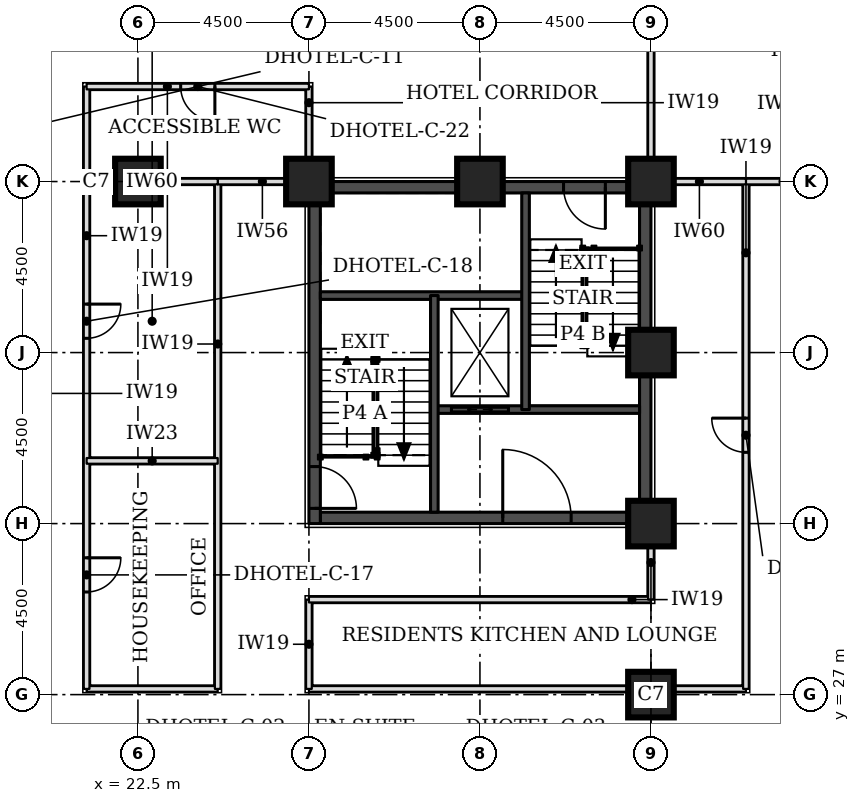
"""IFC4 building model, lengths in metres.
Left out: names, types, materials, properties, quantities, classifications, styles, units other than length and angle.
Written with IfcOpenShell. Run it as: python <this file> out.ifc"""

import sys

from ifc_helpers import new_model, si_unit, direction, frame, frame_2d, origin, origin_2d, place, context, subcontext, project, spatial, rectangle, extrude, element, fill, save


model = new_model("IFC4")
c1 = context("Model", 3, precision=1e-05, world=origin(), true_north=direction((0.0, 1.0)))
c2 = subcontext(c1, "Body", "Model", "MODEL_VIEW")
j1 = project(units=[si_unit("LENGTHUNIT", "METRE"), si_unit("PLANEANGLEUNIT", "RADIAN")], contexts=[c1])
p1 = place(None, origin())
s1 = spatial("IfcSite", under=j1, at=p1, CompositionType="ELEMENT")
p2 = place(p1, origin())
s2 = spatial("IfcBuilding", under=s1, at=p2, CompositionType="ELEMENT")
p3 = place(p2, frame((0.0, 0.0, 56.1)))
s3 = spatial("IfcBuildingStorey", under=s2, at=p3, CompositionType="ELEMENT", Elevation=56.1)
for number, where, z_axis, x_axis in (
    (1, (36.0, 27.0, 0.0), (0.0, 0.0, 1.0), (1.0, 0.0, 0.0)),
    (2, (36.0, 31.5, 0.0), (0.0, 0.0, 1.0), (1.0, 0.0, 0.0)),
    (3, (36.0, 36.0, 0.0), (0.0, 0.0, 1.0), (1.0, 0.0, 0.0)),
    (4, (22.5, 40.5, 0.0), (0.0, 0.0, 1.0), (1.0, 0.0, 0.0)),
    (5, (27.0, 40.5, 0.0), (0.0, 0.0, 1.0), (1.0, 0.0, 0.0)),
    (6, (31.5, 40.5, 0.0), (0.0, 0.0, 1.0), (1.0, 0.0, 0.0)),
    (7, (36.0, 40.5, 0.0), (0.0, 0.0, 1.0), (1.0, 0.0, 0.0)),
):
    element("IfcColumn", number, at=place(p3, frame(where, z_axis=z_axis, x_axis=x_axis)), inside=s3, PredefinedType="COLUMN", context=c2, shape_type="SweptSolid", body=[
        extrude(rectangle(XDim=1.2, YDim=1.2, at=origin_2d()), origin(), (0.0, 0.0, 1.0), 3.3),
    ])
p4 = place(p3, frame((27.3, 31.65, 0.0), z_axis=(0.0, 0.0, 1.0), x_axis=(1.0, 0.0, 0.0)))
e8 = element("IfcWall", 8, at=p4, inside=s3, PredefinedType="SHEAR", context=c2, shape_type="SweptSolid", body=[
    extrude(rectangle(XDim=8.4, YDim=0.3, at=frame_2d((4.2, 0.0))), origin(), (0.0, 0.0, 1.0), 3.3),
])
p5 = place(p4, frame((4.8, 0.0, 0.0)))
e9 = element("IfcOpeningElement", 9, at=p5, cuts=e8, PredefinedType="OPENING", context=c2, shape_type="SweptSolid", body=[
    extrude(rectangle(XDim=1.8, YDim=2.1, at=frame_2d((0.9, 1.05))), frame((0.0, 0.16, 0.0), z_axis=(0.0, -1.0, 0.0), x_axis=(1.0, 0.0, 0.0)), (0.0, 0.0, 1.0), 0.32),
])
p6 = place(p3, frame((27.3, 40.35, 0.0), z_axis=(0.0, 0.0, 1.0), x_axis=(1.0, 0.0, 0.0)))
e10 = element("IfcWall", 10, at=p6, inside=s3, PredefinedType="SHEAR", context=c2, shape_type="SweptSolid", body=[
    extrude(rectangle(XDim=8.4, YDim=0.3, at=frame_2d((4.2, 0.0))), origin(), (0.0, 0.0, 1.0), 3.3),
])
p7 = place(p6, frame((6.4, 0.0, 0.0)))
e11 = element("IfcOpeningElement", 11, at=p7, cuts=e10, PredefinedType="OPENING", context=c2, shape_type="SweptSolid", body=[
    extrude(rectangle(XDim=1.1, YDim=2.1, at=frame_2d((0.55, 1.05))), frame((0.0, 0.16, 0.0), z_axis=(0.0, -1.0, 0.0), x_axis=(1.0, 0.0, 0.0)), (0.0, 0.0, 1.0), 0.32),
])
p8 = place(p3, frame((27.15, 31.5, 0.0), z_axis=(0.0, 0.0, 1.0), x_axis=(0.0, 1.0, 0.0)))
e12 = element("IfcWall", 12, at=p8, inside=s3, PredefinedType="SHEAR", context=c2, shape_type="SweptSolid", body=[
    extrude(rectangle(XDim=9.0, YDim=0.3, at=frame_2d((4.5, 0.0))), origin(), (0.0, 0.0, 1.0), 3.3),
])
p9 = place(p8, frame((0.4, 0.0, 0.0)))
e13 = element("IfcOpeningElement", 13, at=p9, cuts=e12, PredefinedType="OPENING", context=c2, shape_type="SweptSolid", body=[
    extrude(rectangle(XDim=1.1, YDim=2.1, at=frame_2d((0.55, 1.05))), frame((0.0, 0.16, 0.0), z_axis=(0.0, -1.0, 0.0), x_axis=(1.0, 0.0, 0.0)), (0.0, 0.0, 1.0), 0.32),
])
p10 = place(p3, frame((35.85, 31.5, 0.0), z_axis=(0.0, 0.0, 1.0), x_axis=(0.0, 1.0, 0.0)))
e14 = element("IfcWall", 14, at=p10, inside=s3, PredefinedType="SHEAR", context=c2, shape_type="SweptSolid", body=[
    extrude(rectangle(XDim=9.0, YDim=0.3, at=frame_2d((4.5, 0.0))), origin(), (0.0, 0.0, 1.0), 3.3),
])
p11 = place(p3, frame((21.15, 27.15, 0.0), z_axis=(0.0, 0.0, 1.0), x_axis=(1.0, 0.0, 0.0)))
e15 = element("IfcWall", 15, at=p11, inside=s3, PredefinedType="PARTITIONING", context=c2, shape_type="SweptSolid", body=[
    extrude(rectangle(XDim=3.45, YDim=0.15, at=frame_2d((1.725, 0.0))), origin(), (0.0, 0.0, 1.0), 3.08),
])
p12 = place(p3, frame((21.15, 27.15, 0.0), z_axis=(0.0, 0.0, 1.0), x_axis=(0.0, 1.0, 0.0)))
e16 = element("IfcWall", 16, at=p12, inside=s3, PredefinedType="PARTITIONING", context=c2, shape_type="SweptSolid", body=[
    extrude(rectangle(XDim=15.85, YDim=0.15, at=frame_2d((7.925, 0.0))), origin(), (0.0, 0.0, 1.0), 3.08),
])
p13 = place(p12, frame((2.55, 0.0, 0.0)))
e17 = element("IfcOpeningElement", 17, at=p13, cuts=e16, PredefinedType="OPENING", context=c2, shape_type="SweptSolid", body=[
    extrude(rectangle(XDim=0.9, YDim=2.1, at=frame_2d((0.45, 1.05))), frame((0.0, 0.085, 0.0), z_axis=(0.0, -1.0, 0.0), x_axis=(1.0, 0.0, 0.0)), (0.0, 0.0, 1.0), 0.17),
])
p14 = place(p12, frame((9.225, 0.0, 0.0)))
e18 = element("IfcOpeningElement", 18, at=p14, cuts=e16, PredefinedType="OPENING", context=c2, shape_type="SweptSolid", body=[
    extrude(rectangle(XDim=0.9, YDim=2.1, at=frame_2d((0.45, 1.05))), frame((0.0, 0.085, 0.0), z_axis=(0.0, -1.0, 0.0), x_axis=(1.0, 0.0, 0.0)), (0.0, 0.0, 1.0), 0.17),
])
p15 = place(p3, frame((24.6, 27.15, 0.0), z_axis=(0.0, 0.0, 1.0), x_axis=(0.0, 1.0, 0.0)))
e19 = element("IfcWall", 19, at=p15, inside=s3, PredefinedType="PARTITIONING", context=c2, shape_type="SweptSolid", body=[
    extrude(rectangle(XDim=13.35, YDim=0.15, at=frame_2d((6.675, 0.0))), origin(), (0.0, 0.0, 1.0), 3.08),
])
p16 = place(p3, frame((27.0, 27.15, 0.0), z_axis=(0.0, 0.0, 1.0), x_axis=(1.0, 0.0, 0.0)))
e20 = element("IfcWall", 20, at=p16, inside=s3, PredefinedType="PARTITIONING", context=c2, shape_type="SweptSolid", body=[
    extrude(rectangle(XDim=11.5, YDim=0.15, at=frame_2d((5.75, 0.0))), origin(), (0.0, 0.0, 1.0), 3.08),
])
p17 = place(p3, frame((27.0, 27.15, 0.0), z_axis=(0.0, 0.0, 1.0), x_axis=(0.0, 1.0, 0.0)))
e21 = element("IfcWall", 21, at=p17, inside=s3, PredefinedType="PARTITIONING", context=c2, shape_type="SweptSolid", body=[
    extrude(rectangle(XDim=2.35, YDim=0.15, at=frame_2d((1.175, 0.0))), origin(), (0.0, 0.0, 1.0), 3.08),
])
p18 = place(p3, frame((38.5, 27.15, 0.0), z_axis=(0.0, 0.0, 1.0), x_axis=(0.0, 1.0, 0.0)))
e22 = element("IfcWall", 22, at=p18, inside=s3, PredefinedType="PARTITIONING", context=c2, shape_type="SweptSolid", body=[
    extrude(rectangle(XDim=13.35, YDim=0.15, at=frame_2d((6.675, 0.0))), origin(), (0.0, 0.0, 1.0), 3.08),
])
p19 = place(p18, frame((6.225, 0.0, 0.0)))
e23 = element("IfcOpeningElement", 23, at=p19, cuts=e22, PredefinedType="OPENING", context=c2, shape_type="SweptSolid", body=[
    extrude(rectangle(XDim=0.9, YDim=2.1, at=frame_2d((0.45, 1.05))), frame((0.0, 0.085, 0.0), z_axis=(0.0, -1.0, 0.0), x_axis=(1.0, 0.0, 0.0)), (0.0, 0.0, 1.0), 0.17),
])
p20 = place(p3, frame((27.0, 29.5, 0.0), z_axis=(0.0, 0.0, 1.0), x_axis=(1.0, 0.0, 0.0)))
e24 = element("IfcWall", 24, at=p20, inside=s3, PredefinedType="PARTITIONING", context=c2, shape_type="SweptSolid", body=[
    extrude(rectangle(XDim=9.0, YDim=0.15, at=frame_2d((4.5, 0.0))), origin(), (0.0, 0.0, 1.0), 3.08),
])
p21 = place(p3, frame((36.0, 29.5, 0.0), z_axis=(0.0, 0.0, 1.0), x_axis=(0.0, 1.0, 0.0)))
e25 = element("IfcWall", 25, at=p21, inside=s3, PredefinedType="PARTITIONING", context=c2, shape_type="SweptSolid", body=[
    extrude(rectangle(XDim=1.95, YDim=0.15, at=frame_2d((0.975, 0.0))), origin(), (0.0, 0.0, 1.0), 2.33),
])
p22 = place(p3, frame((24.6, 40.5, 0.0), z_axis=(0.0, 0.0, 1.0), x_axis=(1.0, 0.0, 0.0)))
e26 = element("IfcWall", 26, at=p22, inside=s3, PredefinedType="PARTITIONING", context=c2, shape_type="SweptSolid", body=[
    extrude(rectangle(XDim=2.35, YDim=0.15, at=frame_2d((1.175, 0.0))), origin(), (0.0, 0.0, 1.0), 2.33),
])
p23 = place(p3, frame((38.5, 40.5, 0.0), z_axis=(0.0, 0.0, 1.0), x_axis=(1.0, 0.0, 0.0)))
e27 = element("IfcWall", 27, at=p23, inside=s3, PredefinedType="PARTITIONING", context=c2, shape_type="SweptSolid", body=[
    extrude(rectangle(XDim=1.95, YDim=0.15, at=frame_2d((0.975, 0.0))), origin(), (0.0, 0.0, 1.0), 2.33),
])
p24 = place(p3, frame((27.0, 40.55, 0.0), z_axis=(0.0, 0.0, 1.0), x_axis=(0.0, 1.0, 0.0)))
e28 = element("IfcWall", 28, at=p24, inside=s3, PredefinedType="PARTITIONING", context=c2, shape_type="SweptSolid", body=[
    extrude(rectangle(XDim=2.45, YDim=0.15, at=frame_2d((1.225, 0.0))), origin(), (0.0, 0.0, 1.0), 3.08),
])
p25 = place(p3, frame((36.0, 40.55, 0.0), z_axis=(0.0, 0.0, 1.0), x_axis=(0.0, 1.0, 0.0)))
e29 = element("IfcWall", 29, at=p25, inside=s3, PredefinedType="PARTITIONING", context=c2, shape_type="SweptSolid", body=[
    extrude(rectangle(XDim=4.4, YDim=0.15, at=frame_2d((2.2, 0.0))), origin(), (0.0, 0.0, 1.0), 2.33),
])
p26 = place(p3, frame((21.15, 43.0, 0.0), z_axis=(0.0, 0.0, 1.0), x_axis=(1.0, 0.0, 0.0)))
e30 = element("IfcWall", 30, at=p26, inside=s3, PredefinedType="PARTITIONING", context=c2, shape_type="SweptSolid", body=[
    extrude(rectangle(XDim=5.85, YDim=0.15, at=frame_2d((2.925, 0.0))), origin(), (0.0, 0.0, 1.0), 3.08),
])
p27 = place(p26, frame((2.475, 0.0, 0.0)))
e31 = element("IfcOpeningElement", 31, at=p27, cuts=e30, PredefinedType="OPENING", context=c2, shape_type="SweptSolid", body=[
    extrude(rectangle(XDim=0.9, YDim=2.1, at=frame_2d((0.45, 1.05))), frame((0.0, 0.085, 0.0), z_axis=(0.0, -1.0, 0.0), x_axis=(1.0, 0.0, 0.0)), (0.0, 0.0, 1.0), 0.17),
])
p28 = place(p3, frame((21.15, 33.15, 0.0), z_axis=(0.0, 0.0, 1.0), x_axis=(1.0, 0.0, 0.0)))
e32 = element("IfcWall", 32, at=p28, inside=s3, PredefinedType="PARTITIONING", context=c2, shape_type="SweptSolid", body=[
    extrude(rectangle(XDim=3.45, YDim=0.15, at=frame_2d((1.725, 0.0))), origin(), (0.0, 0.0, 1.0), 3.08),
])
p29 = place(p3, frame((21.15, 40.5, 0.0), z_axis=(0.0, 0.0, 1.0), x_axis=(1.0, 0.0, 0.0)))
e33 = element("IfcWall", 33, at=p29, inside=s3, PredefinedType="PARTITIONING", context=c2, shape_type="SweptSolid", body=[
    extrude(rectangle(XDim=3.45, YDim=0.15, at=frame_2d((1.725, 0.0))), origin(), (0.0, 0.0, 1.0), 2.33),
])
p30 = place(p3, frame((36.05, 40.5, 0.0), z_axis=(0.0, 0.0, 1.0), x_axis=(1.0, 0.0, 0.0)))
e34 = element("IfcWall", 34, at=p30, inside=s3, PredefinedType="PARTITIONING", context=c2, shape_type="SweptSolid", body=[
    extrude(rectangle(XDim=2.45, YDim=0.15, at=frame_2d((1.225, 0.0))), origin(), (0.0, 0.0, 1.0), 2.33),
])
p31 = place(p3, frame((30.3, 34.5, 0.0), z_axis=(0.0, 0.0, 1.0), x_axis=(1.0, 0.0, 0.0)))
e35 = element("IfcWall", 35, at=p31, inside=s3, PredefinedType="SOLIDWALL", context=c2, shape_type="SweptSolid", body=[
    extrude(rectangle(XDim=5.4, YDim=0.2, at=frame_2d((2.7, 0.0))), origin(), (0.0, 0.0, 1.0), 3.08),
])
p32 = place(p31, frame((0.45, 0.0, 0.0)))
e36 = element("IfcOpeningElement", 36, at=p32, cuts=e35, PredefinedType="OPENING", context=c2, shape_type="SweptSolid", body=[
    extrude(rectangle(XDim=1.5, YDim=2.1, at=frame_2d((0.75, 1.05))), frame((0.0, 0.11, 0.0), z_axis=(0.0, -1.0, 0.0), x_axis=(1.0, 0.0, 0.0)), (0.0, 0.0, 1.0), 0.22),
])
p33 = place(p3, frame((27.3, 37.5, 0.0), z_axis=(0.0, 0.0, 1.0), x_axis=(1.0, 0.0, 0.0)))
e37 = element("IfcWall", 37, at=p33, inside=s3, PredefinedType="SOLIDWALL", context=c2, shape_type="SweptSolid", body=[
    extrude(rectangle(XDim=5.4, YDim=0.2, at=frame_2d((2.7, 0.0))), origin(), (0.0, 0.0, 1.0), 3.08),
])
for number, where, z_axis, x_axis in (
    (38, (30.3, 31.8, 0.0), (0.0, 0.0, 1.0), (0.0, 1.0, 0.0)),
    (39, (32.7, 34.5, 0.0), (0.0, 0.0, 1.0), (0.0, 1.0, 0.0)),
):
    element("IfcWall", number, at=place(p3, frame(where, z_axis=z_axis, x_axis=x_axis)), inside=s3, PredefinedType="SOLIDWALL", context=c2, shape_type="SweptSolid", body=[
        extrude(rectangle(XDim=5.7, YDim=0.2, at=frame_2d((2.85, 0.0))), origin(), (0.0, 0.0, 1.0), 3.08),
    ])
p34 = place(p13, frame((0.9, 0.0, 0.0), z_axis=(0.0, 0.0, 1.0), x_axis=(-1.0, 0.0, 0.0)))
e40 = element("IfcDoor", 40, at=p34, inside=s3, OperationType="SINGLE_SWING_LEFT", PredefinedType="DOOR", context=c2, shape_type="SweptSolid", body=[
    extrude(rectangle(XDim=0.9, YDim=2.1, at=frame_2d((0.45, 1.05))), frame((0.0, 0.025, 0.0), z_axis=(0.0, -1.0, 0.0), x_axis=(1.0, 0.0, 0.0)), (0.0, 0.0, 1.0), 0.05),
])
fill(e17, e40)
p35 = place(p14, frame((0.9, 0.0, 0.0), z_axis=(0.0, 0.0, 1.0), x_axis=(-1.0, 0.0, 0.0)))
e41 = element("IfcDoor", 41, at=p35, inside=s3, OperationType="SINGLE_SWING_LEFT", PredefinedType="DOOR", context=c2, shape_type="SweptSolid", body=[
    extrude(rectangle(XDim=0.9, YDim=2.1, at=frame_2d((0.45, 1.05))), frame((0.0, 0.025, 0.0), z_axis=(0.0, -1.0, 0.0), x_axis=(1.0, 0.0, 0.0)), (0.0, 0.0, 1.0), 0.05),
])
fill(e18, e41)
p36 = place(p19, origin())
e42 = element("IfcDoor", 42, at=p36, inside=s3, OperationType="SINGLE_SWING_RIGHT", PredefinedType="DOOR", context=c2, shape_type="SweptSolid", body=[
    extrude(rectangle(XDim=0.9, YDim=2.1, at=frame_2d((0.45, 1.05))), frame((0.0, 0.025, 0.0), z_axis=(0.0, -1.0, 0.0), x_axis=(1.0, 0.0, 0.0)), (0.0, 0.0, 1.0), 0.05),
])
fill(e23, e42)
p37 = place(p27, frame((0.9, 0.0, 0.0), z_axis=(0.0, 0.0, 1.0), x_axis=(-1.0, 0.0, 0.0)))
e43 = element("IfcDoor", 43, at=p37, inside=s3, OperationType="SINGLE_SWING_LEFT", PredefinedType="DOOR", context=c2, shape_type="SweptSolid", body=[
    extrude(rectangle(XDim=0.9, YDim=2.1, at=frame_2d((0.45, 1.05))), frame((0.0, 0.025, 0.0), z_axis=(0.0, -1.0, 0.0), x_axis=(1.0, 0.0, 0.0)), (0.0, 0.0, 1.0), 0.05),
])
fill(e31, e43)
p38 = place(p9, frame((1.1, 0.0, 0.0), z_axis=(0.0, 0.0, 1.0), x_axis=(-1.0, 0.0, 0.0)))
e44 = element("IfcDoor", 44, at=p38, inside=s3, OperationType="SINGLE_SWING_RIGHT", PredefinedType="DOOR", context=c2, shape_type="SweptSolid", body=[
    extrude(rectangle(XDim=1.1, YDim=2.1, at=frame_2d((0.55, 1.05))), frame((0.0, 0.025, 0.0), z_axis=(0.0, -1.0, 0.0), x_axis=(1.0, 0.0, 0.0)), (0.0, 0.0, 1.0), 0.05),
])
fill(e13, e44)
p39 = place(p7, frame((1.1, 0.0, 0.0), z_axis=(0.0, 0.0, 1.0), x_axis=(-1.0, 0.0, 0.0)))
e45 = element("IfcDoor", 45, at=p39, inside=s3, OperationType="SINGLE_SWING_LEFT", PredefinedType="DOOR", context=c2, shape_type="SweptSolid", body=[
    extrude(rectangle(XDim=1.1, YDim=2.1, at=frame_2d((0.55, 1.05))), frame((0.0, 0.025, 0.0), z_axis=(0.0, -1.0, 0.0), x_axis=(1.0, 0.0, 0.0)), (0.0, 0.0, 1.0), 0.05),
])
fill(e11, e45)
p40 = place(p32, origin())
e46 = element("IfcDoor", 46, at=p40, inside=s3, OperationType="DOUBLE_DOOR_SLIDING", PredefinedType="DOOR", context=c2, shape_type="SweptSolid", body=[
    extrude(rectangle(XDim=1.5, YDim=2.1, at=frame_2d((0.75, 1.05))), frame((0.0, 0.025, 0.0), z_axis=(0.0, -1.0, 0.0), x_axis=(1.0, 0.0, 0.0)), (0.0, 0.0, 1.0), 0.05),
])
fill(e36, e46)
p41 = place(p5, origin())
e47 = element("IfcDoor", 47, at=p41, inside=s3, OperationType="SINGLE_SWING_LEFT", PredefinedType="DOOR", context=c2, shape_type="SweptSolid", body=[
    extrude(rectangle(XDim=1.8, YDim=2.1, at=frame_2d((0.9, 1.05))), frame((0.0, 0.025, 0.0), z_axis=(0.0, -1.0, 0.0), x_axis=(1.0, 0.0, 0.0)), (0.0, 0.0, 1.0), 0.05),
])
fill(e9, e47)
save(model, sys.argv[1])
